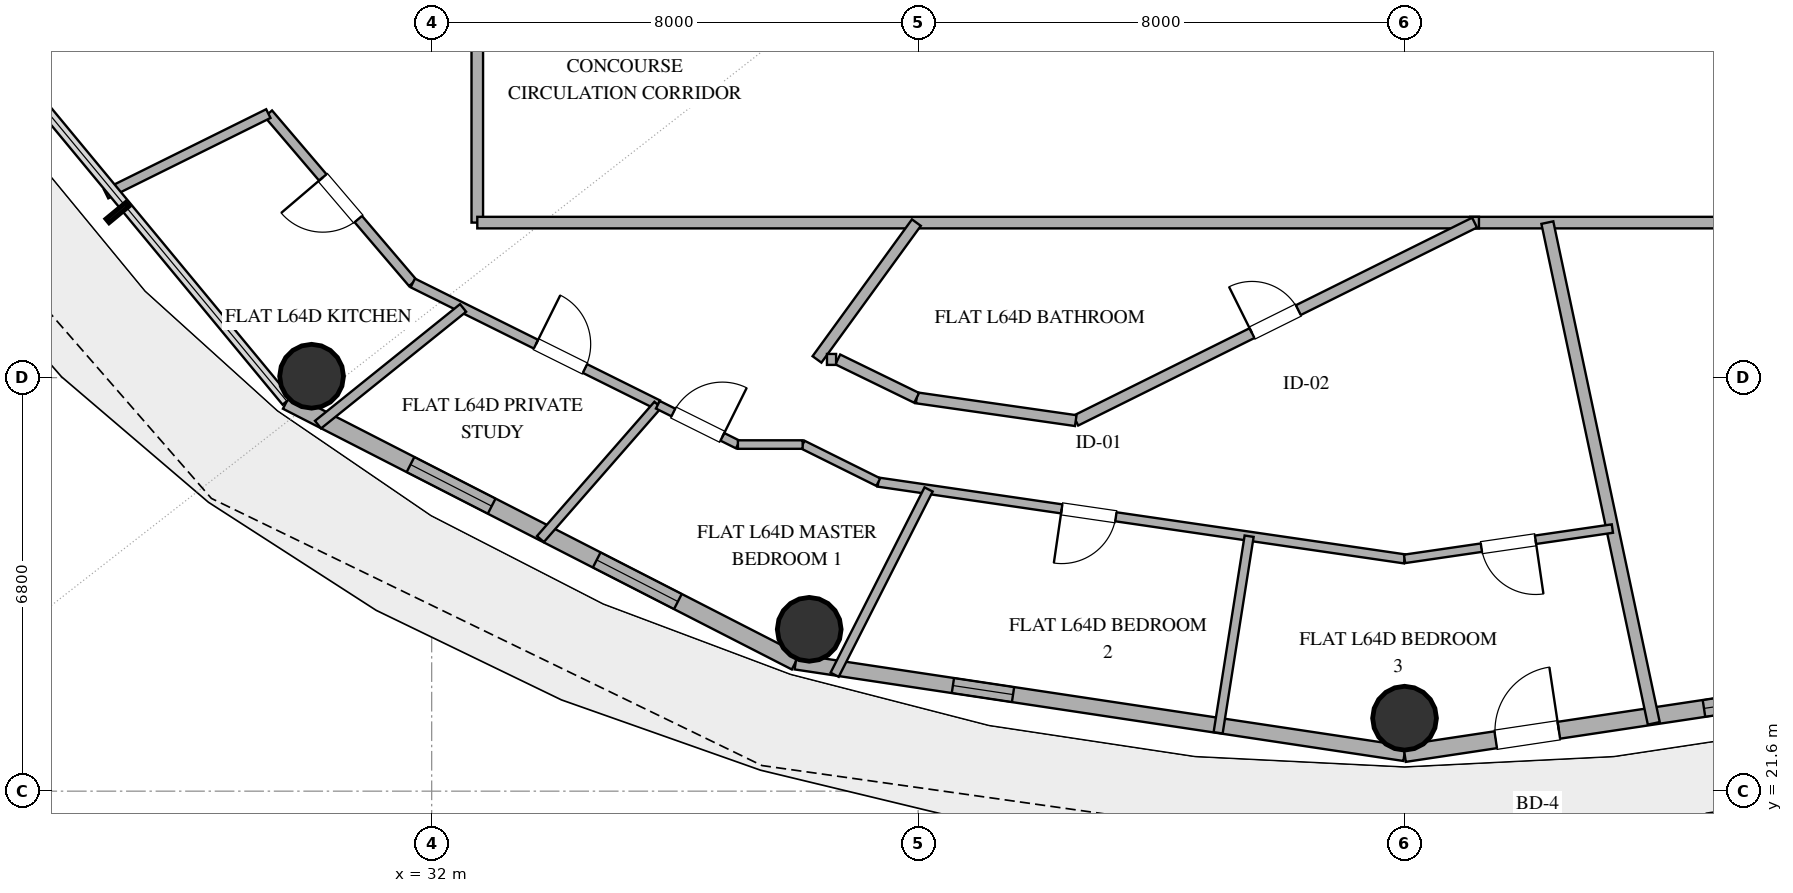
"""IFC4 building model, lengths in metres.
Left out: names, types, materials, properties, quantities, classifications, styles, units other than length and angle.
Written with IfcOpenShell. Run it as: python <this file> out.ifc"""

import sys

from ifc_helpers import new_model, si_unit, direction, frame, frame_2d, origin, origin_2d, place, context, subcontext, project, spatial, rectangle, hollow_circle, extrude, element, fill, save


model = new_model("IFC4")
c1 = context("Model", 3, precision=1e-05, world=origin(), true_north=direction((0.0, 1.0)))
c2 = subcontext(c1, "Body", "Model", "MODEL_VIEW")
j1 = project(units=[si_unit("LENGTHUNIT", "METRE"), si_unit("PLANEANGLEUNIT", "RADIAN")], contexts=[c1])
p1 = place(None, origin())
s1 = spatial("IfcSite", under=j1, at=p1, CompositionType="ELEMENT")
p2 = place(p1, origin())
s2 = spatial("IfcBuilding", under=s1, at=p2, CompositionType="ELEMENT")
p3 = place(p2, frame((0.0, 0.0, 249.6)))
s3 = spatial("IfcBuildingStorey", under=s2, at=p3, CompositionType="ELEMENT", Elevation=249.6)
for number, where, z_axis, x_axis in (
    (1, (30.025, 28.424, 0.0), (0.0, 0.0, 1.0), (1.0, 0.0, 0.0)),
    (2, (38.209, 24.261, 0.0), (0.0, 0.0, 1.0), (1.0, 0.0, 0.0)),
    (3, (48.0, 22.8, 0.0), (0.0, 0.0, 1.0), (1.0, 0.0, 0.0)),
):
    element("IfcColumn", number, at=place(p3, frame(where, z_axis=z_axis, x_axis=x_axis)), inside=s3, PredefinedType="COLUMN", context=c2, shape_type="SweptSolid", body=[
        extrude(hollow_circle(Radius=0.525, WallThickness=0.028, at=origin_2d()), origin(), (0.0, 0.0, 1.0), 3.36),
    ])
p4 = place(p3, frame((29.617, 28.013, 0.0), z_axis=(0.0, 0.0, 1.0), x_axis=(0.890007394051, -0.455946091699, 0.0)))
e4 = element("IfcWall", 4, at=p4, inside=s3, PredefinedType="SOLIDWALL", context=c2, shape_type="SweptSolid", body=[
    extrude(rectangle(XDim=9.404, YDim=0.28, at=frame_2d((4.702, 0.0))), origin(), (0.0, 0.0, 1.0), 3.36),
])
p5 = place(p4, frame((2.286, 0.0, 0.85)))
e5 = element("IfcOpeningElement", 5, at=p5, cuts=e4, PredefinedType="OPENING", context=c2, shape_type="SweptSolid", body=[
    extrude(rectangle(XDim=1.5, YDim=2.0, at=frame_2d((0.75, 1.0))), frame((0.0, 0.15, 0.0), z_axis=(0.0, -1.0, 0.0), x_axis=(1.0, 0.0, 0.0)), (0.0, 0.0, 1.0), 0.3),
])
p6 = place(p4, frame((5.727, 0.0, 0.85)))
e6 = element("IfcOpeningElement", 6, at=p6, cuts=e4, PredefinedType="OPENING", context=c2, shape_type="SweptSolid", body=[
    extrude(rectangle(XDim=1.5, YDim=1.8, at=frame_2d((0.75, 0.9))), frame((0.0, 0.15, 0.0), z_axis=(0.0, -1.0, 0.0), x_axis=(1.0, 0.0, 0.0)), (0.0, 0.0, 1.0), 0.3),
])
p7 = place(p3, frame((37.987, 23.726, 0.0), z_axis=(0.0, 0.0, 1.0), x_axis=(0.988882522213, -0.148698881169, 0.0)))
e7 = element("IfcWall", 7, at=p7, inside=s3, PredefinedType="SOLIDWALL", context=c2, shape_type="SweptSolid", body=[
    extrude(rectangle(XDim=10.125, YDim=0.25, at=frame_2d((5.062, 0.0))), origin(), (0.0, 0.0, 1.0), 3.36),
])
p8 = place(p7, frame((2.614, 0.0, 1.42)))
e8 = element("IfcOpeningElement", 8, at=p8, cuts=e7, PredefinedType="OPENING", context=c2, shape_type="SweptSolid", body=[
    extrude(rectangle(XDim=1.0, YDim=1.05, at=frame_2d((0.5, 0.525))), frame((0.0, 0.135, 0.0), z_axis=(0.0, -1.0, 0.0), x_axis=(1.0, 0.0, 0.0)), (0.0, 0.0, 1.0), 0.27),
])
p9 = place(p3, frame((48.0, 22.22, 0.0), z_axis=(0.0, 0.0, 1.0), x_axis=(0.988882522213, 0.148698881169, 0.0)))
e9 = element("IfcWall", 9, at=p9, inside=s3, PredefinedType="SOLIDWALL", context=c2, shape_type="SweptSolid", body=[
    extrude(rectangle(XDim=10.125, YDim=0.28, at=frame_2d((5.062, 0.0))), origin(), (0.0, 0.0, 1.0), 3.36),
])
p10 = place(p9, frame((1.516, 0.0, 0.0)))
e10 = element("IfcOpeningElement", 10, at=p10, cuts=e9, PredefinedType="OPENING", context=c2, shape_type="SweptSolid", body=[
    extrude(rectangle(XDim=1.05, YDim=2.2, at=frame_2d((0.525, 1.1))), frame((0.0, 0.15, 0.0), z_axis=(0.0, -1.0, 0.0), x_axis=(1.0, 0.0, 0.0)), (0.0, 0.0, 1.0), 0.3),
])
p11 = place(p9, frame((4.98, 0.0, 0.85)))
e11 = element("IfcOpeningElement", 11, at=p11, cuts=e9, PredefinedType="OPENING", context=c2, shape_type="SweptSolid", body=[
    extrude(rectangle(XDim=1.2, YDim=1.8, at=frame_2d((0.6, 0.9))), frame((0.0, 0.15, 0.0), z_axis=(0.0, -1.0, 0.0), x_axis=(1.0, 0.0, 0.0)), (0.0, 0.0, 1.0), 0.3),
])
p12 = place(p9, frame((6.783, 0.0, 0.85)))
e12 = element("IfcOpeningElement", 12, at=p12, cuts=e9, PredefinedType="OPENING", context=c2, shape_type="SweptSolid", body=[
    extrude(rectangle(XDim=1.2, YDim=1.8, at=frame_2d((0.6, 0.9))), frame((0.0, 0.15, 0.0), z_axis=(0.0, -1.0, 0.0), x_axis=(1.0, 0.0, 0.0)), (0.0, 0.0, 1.0), 0.3),
])
p13 = place(p3, frame((63.25, 30.95, 0.0), z_axis=(0.0, 0.0, 1.0), x_axis=(-1.0, 0.0, 0.0)))
e13 = element("IfcWall", 13, at=p13, inside=s3, PredefinedType="PARTITIONING", context=c2, shape_type="SweptSolid", body=[
    extrude(rectangle(XDim=14.17, YDim=0.19, at=frame_2d((7.085, 0.0))), origin(), (0.0, 0.0, 1.0), 2.72),
])
p14 = place(p13, frame((5.967, 0.0, 0.0)))
e14 = element("IfcOpeningElement", 14, at=p14, cuts=e13, PredefinedType="OPENING", context=c2, shape_type="SweptSolid", body=[
    extrude(rectangle(XDim=1.0, YDim=2.2, at=frame_2d((0.5, 1.1))), frame((0.0, 0.105, 0.0), z_axis=(0.0, -1.0, 0.0), x_axis=(1.0, 0.0, 0.0)), (0.0, 0.0, 1.0), 0.21),
])
p15 = place(p3, frame((32.75, 30.95, 0.0), z_axis=(0.0, 0.0, 1.0), x_axis=(0.0, 1.0, 0.0)))
e15 = element("IfcWall", 15, at=p15, inside=s3, PredefinedType="PARTITIONING", context=c2, shape_type="SweptSolid", body=[
    extrude(rectangle(XDim=22.1, YDim=0.19, at=frame_2d((11.05, 0.0))), origin(), (0.0, 0.0, 1.0), 2.72),
])
p16 = place(p15, frame((15.258, 0.0, 0.0)))
e16 = element("IfcOpeningElement", 16, at=p16, cuts=e15, PredefinedType="OPENING", context=c2, shape_type="SweptSolid", body=[
    extrude(rectangle(XDim=1.0, YDim=2.2, at=frame_2d((0.5, 1.1))), frame((0.0, 0.105, 0.0), z_axis=(0.0, -1.0, 0.0), x_axis=(1.0, 0.0, 0.0)), (0.0, 0.0, 1.0), 0.21),
])
p17 = place(p15, frame((4.24, 0.0, 0.0)))
e17 = element("IfcOpeningElement", 17, at=p17, cuts=e15, PredefinedType="OPENING", context=c2, shape_type="SweptSolid", body=[
    extrude(rectangle(XDim=1.0, YDim=2.2, at=frame_2d((0.5, 1.1))), frame((0.0, 0.105, 0.0), z_axis=(0.0, -1.0, 0.0), x_axis=(1.0, 0.0, 0.0)), (0.0, 0.0, 1.0), 0.21),
])
p18 = place(p3, frame((49.224, 30.95, 0.0), z_axis=(0.0, 0.0, 1.0), x_axis=(-1.0, 0.0, 0.0)))
e18 = element("IfcWall", 18, at=p18, inside=s3, PredefinedType="PARTITIONING", context=c2, shape_type="SweptSolid", body=[
    extrude(rectangle(XDim=16.474, YDim=0.19, at=frame_2d((8.237, 0.0))), origin(), (0.0, 0.0, 1.0), 2.72),
])
p19 = place(p3, frame((42.593, 27.694, 0.0), z_axis=(0.0, 0.0, 1.0), x_axis=(0.895690491041, 0.444678023134, 0.0)))
e19 = element("IfcWall", 19, at=p19, inside=s3, PredefinedType="PLUMBINGWALL", context=c2, shape_type="SweptSolid", body=[
    extrude(rectangle(XDim=7.323, YDim=0.18, at=frame_2d((3.662, 0.0))), origin(), (0.0, 0.0, 1.0), 2.72),
])
p20 = place(p19, frame((3.237, 0.0, 0.0)))
e20 = element("IfcOpeningElement", 20, at=p20, cuts=e19, PredefinedType="OPENING", context=c2, shape_type="SweptSolid", body=[
    extrude(rectangle(XDim=0.85, YDim=2.1, at=frame_2d((0.425, 1.05))), frame((0.0, 0.1, 0.0), z_axis=(0.0, -1.0, 0.0), x_axis=(1.0, 0.0, 0.0)), (0.0, 0.0, 1.0), 0.2),
])
p21 = place(p3, frame((48.0, 25.42, 0.0), z_axis=(0.0, 0.0, 1.0), x_axis=(-0.989532150642, 0.144312587273, 0.0)))
e21 = element("IfcWall", 21, at=p21, inside=s3, PredefinedType="PARTITIONING", context=c2, shape_type="SweptSolid", body=[
    extrude(rectangle(XDim=8.746, YDim=0.15, at=frame_2d((4.373, 0.0))), origin(), (0.0, 0.0, 1.0), 2.72),
])
p22 = place(p21, frame((4.798, 0.0, 0.0)))
e22 = element("IfcOpeningElement", 22, at=p22, cuts=e21, PredefinedType="OPENING", context=c2, shape_type="SweptSolid", body=[
    extrude(rectangle(XDim=0.9, YDim=2.1, at=frame_2d((0.45, 1.05))), frame((0.0, 0.085, 0.0), z_axis=(0.0, -1.0, 0.0), x_axis=(1.0, 0.0, 0.0)), (0.0, 0.0, 1.0), 0.17),
])
p23 = place(p3, frame((50.349, 30.95, 0.0), z_axis=(0.0, 0.0, 1.0), x_axis=(0.207930550935, -0.978143591702, 0.0)))
e23 = element("IfcWall", 23, at=p23, inside=s3, PredefinedType="PARTITIONING", context=c2, shape_type="SweptSolid", body=[
    extrude(rectangle(XDim=8.419, YDim=0.2, at=frame_2d((4.209, 0.0))), origin(), (0.0, 0.0, 1.0), 2.72),
])
p24 = place(p3, frame((31.689, 29.958, 0.0), z_axis=(0.0, 0.0, 1.0), x_axis=(-0.648993169548, 0.7607942336, 0.0)))
e24 = element("IfcWall", 24, at=p24, inside=s3, PredefinedType="PLUMBINGWALL", context=c2, shape_type="SweptSolid", body=[
    extrude(rectangle(XDim=3.66, YDim=0.16, at=frame_2d((1.83, 0.0))), origin(), (0.0, 0.0, 1.0), 2.72),
])
p25 = place(p24, frame((1.38, 0.0, 0.0)))
e25 = element("IfcOpeningElement", 25, at=p25, cuts=e24, PredefinedType="OPENING", context=c2, shape_type="SweptSolid", body=[
    extrude(rectangle(XDim=0.9, YDim=2.1, at=frame_2d((0.45, 1.05))), frame((0.0, 0.09, 0.0), z_axis=(0.0, -1.0, 0.0), x_axis=(1.0, 0.0, 0.0)), (0.0, 0.0, 1.0), 0.18),
])
p26 = place(p3, frame((31.689, 29.958, 0.0), z_axis=(0.0, 0.0, 1.0), x_axis=(0.895477004863, -0.445107777691, 0.0)))
e26 = element("IfcWall", 26, at=p26, inside=s3, PredefinedType="PLUMBINGWALL", context=c2, shape_type="SweptSolid", body=[
    extrude(rectangle(XDim=4.501, YDim=0.16, at=frame_2d((2.25, 0.0))), origin(), (0.0, 0.0, 1.0), 2.72),
])
p27 = place(p26, frame((2.263, 0.0, 0.0)))
e27 = element("IfcOpeningElement", 27, at=p27, cuts=e26, PredefinedType="OPENING", context=c2, shape_type="SweptSolid", body=[
    extrude(rectangle(XDim=0.9, YDim=2.1, at=frame_2d((0.45, 1.05))), frame((0.0, 0.09, 0.0), z_axis=(0.0, -1.0, 0.0), x_axis=(1.0, 0.0, 0.0)), (0.0, 0.0, 1.0), 0.18),
])
p28 = place(p3, frame((51.418, 25.918, 0.0), z_axis=(0.0, 0.0, 1.0), x_axis=(-0.989531088682, -0.144319868801, 0.0)))
e28 = element("IfcWall", 28, at=p28, inside=s3, PredefinedType="PARTITIONING", context=c2, shape_type="SweptSolid", body=[
    extrude(rectangle(XDim=3.454, YDim=0.14, at=frame_2d((1.727, 0.0))), origin(), (0.0, 0.0, 1.0), 2.72),
])
p29 = place(p28, frame((1.277, 0.0, 0.0)))
e29 = element("IfcOpeningElement", 29, at=p29, cuts=e28, PredefinedType="OPENING", context=c2, shape_type="SweptSolid", body=[
    extrude(rectangle(XDim=0.9, YDim=2.1, at=frame_2d((0.45, 1.05))), frame((0.0, 0.08, 0.0), z_axis=(0.0, -1.0, 0.0), x_axis=(1.0, 0.0, 0.0)), (0.0, 0.0, 1.0), 0.16),
])
p30 = place(p3, frame((40.172, 26.562, 0.0), z_axis=(0.0, 0.0, 1.0), x_axis=(-0.452265757691, -0.891883223533, 0.0)))
e30 = element("IfcWall", 30, at=p30, inside=s3, PredefinedType="PARTITIONING", context=c2, shape_type="SweptSolid", body=[
    extrude(rectangle(XDim=3.417, YDim=0.15, at=frame_2d((1.708, 0.0))), origin(), (0.0, 0.0, 1.0), 2.72),
])
p31 = place(p3, frame((44.934, 22.56, 0.0), z_axis=(0.0, 0.0, 1.0), x_axis=(0.155828503033, 0.98778412502, 0.0)))
e31 = element("IfcWall", 31, at=p31, inside=s3, PredefinedType="PARTITIONING", context=c2, shape_type="SweptSolid", body=[
    extrude(rectangle(XDim=3.273, YDim=0.15, at=frame_2d((1.636, 0.0))), origin(), (0.0, 0.0, 1.0), 2.72),
])
p32 = place(p3, frame((30.131, 27.627, 0.0), z_axis=(0.0, 0.0, 1.0), x_axis=(0.779248157205, 0.62671549326, 0.0)))
e32 = element("IfcWall", 32, at=p32, inside=s3, PredefinedType="PLUMBINGWALL", context=c2, shape_type="SweptSolid", body=[
    extrude(rectangle(XDim=3.062, YDim=0.16, at=frame_2d((1.531, 0.0))), origin(), (0.0, 0.0, 1.0), 2.72),
])
p33 = place(p3, frame((29.314, 32.742, 0.0), z_axis=(0.0, 0.0, 1.0), x_axis=(-0.896093729672, -0.443864875432, 0.0)))
e33 = element("IfcWall", 33, at=p33, inside=s3, PredefinedType="PLUMBINGWALL", context=c2, shape_type="SweptSolid", body=[
    extrude(rectangle(XDim=2.977, YDim=0.16, at=frame_2d((1.489, 0.0))), origin(), (0.0, 0.0, 1.0), 2.72),
])
p34 = place(p3, frame((35.719, 27.955, 0.0), z_axis=(0.0, 0.0, 1.0), x_axis=(-0.658257126569, -0.752793169019, 0.0)))
e34 = element("IfcWall", 34, at=p34, inside=s3, PredefinedType="PARTITIONING", context=c2, shape_type="SweptSolid", body=[
    extrude(rectangle(XDim=2.934, YDim=0.15, at=frame_2d((1.467, 0.0))), origin(), (0.0, 0.0, 1.0), 2.72),
])
p35 = place(p3, frame((39.972, 30.95, 0.0), z_axis=(0.0, 0.0, 1.0), x_axis=(-0.587795827483, -0.809009310944, 0.0)))
e35 = element("IfcWall", 35, at=p35, inside=s3, PredefinedType="PLUMBINGWALL", context=c2, shape_type="SweptSolid", body=[
    extrude(rectangle(XDim=2.781, YDim=0.18, at=frame_2d((1.391, 0.0))), origin(), (0.0, 0.0, 1.0), 2.72),
])
p36 = place(p3, frame((39.976, 28.068, 0.0), z_axis=(0.0, 0.0, 1.0), x_axis=(0.989923613655, -0.141602398034, 0.0)))
e36 = element("IfcWall", 36, at=p36, inside=s3, PredefinedType="PLUMBINGWALL", context=c2, shape_type="SweptSolid", body=[
    extrude(rectangle(XDim=2.643, YDim=0.18, at=frame_2d((1.322, 0.0))), origin(), (0.0, 0.0, 1.0), 2.72),
])
p37 = place(p3, frame((35.719, 27.955, 0.0), z_axis=(0.0, 0.0, 1.0), x_axis=(0.895454269924, -0.445153513381, 0.0)))
e37 = element("IfcWall", 37, at=p37, inside=s3, PredefinedType="PARTITIONING", context=c2, shape_type="SweptSolid", body=[
    extrude(rectangle(XDim=1.47, YDim=0.14, at=frame_2d((0.735, 0.0))), origin(), (0.0, 0.0, 1.0), 2.72),
])
p38 = place(p37, frame((0.285, 0.0, 0.0)))
e38 = element("IfcOpeningElement", 38, at=p38, cuts=e37, PredefinedType="OPENING", context=c2, shape_type="SweptSolid", body=[
    extrude(rectangle(XDim=0.9, YDim=2.1, at=frame_2d((0.45, 1.05))), frame((0.0, 0.08, 0.0), z_axis=(0.0, -1.0, 0.0), x_axis=(1.0, 0.0, 0.0)), (0.0, 0.0, 1.0), 0.16),
])
p39 = place(p3, frame((38.679, 28.7, 0.0), z_axis=(0.0, 0.0, 1.0), x_axis=(0.898916394035, -0.438120207861, 0.0)))
e39 = element("IfcWall", 39, at=p39, inside=s3, PredefinedType="PLUMBINGWALL", context=c2, shape_type="SweptSolid", body=[
    extrude(rectangle(XDim=1.443, YDim=0.18, at=frame_2d((0.721, 0.0))), origin(), (0.0, 0.0, 1.0), 2.72),
])
p40 = place(p3, frame((38.101, 27.3, 0.0), z_axis=(0.0, 0.0, 1.0), x_axis=(0.895584310315, -0.444891833053, 0.0)))
e40 = element("IfcWall", 40, at=p40, inside=s3, PredefinedType="PARTITIONING", context=c2, shape_type="SweptSolid", body=[
    extrude(rectangle(XDim=1.389, YDim=0.14, at=frame_2d((0.694, 0.0))), origin(), (0.0, 0.0, 1.0), 2.72),
])
p41 = place(p3, frame((37.036, 27.3, 0.0), z_axis=(0.0, 0.0, 1.0), x_axis=(1.0, 0.0, 0.0)))
e41 = element("IfcWall", 41, at=p41, inside=s3, PredefinedType="PARTITIONING", context=c2, shape_type="SweptSolid", body=[
    extrude(rectangle(XDim=1.065, YDim=0.14, at=frame_2d((0.533, 0.0))), origin(), (0.0, 0.0, 1.0), 2.72),
])
p42 = place(p3, frame((38.501, 28.7, 0.0), z_axis=(0.0, 0.0, 1.0), x_axis=(1.0, 0.0, 0.0)))
e42 = element("IfcWall", 42, at=p42, inside=s3, PredefinedType="PLUMBINGWALL", context=c2, shape_type="SweptSolid", body=[
    extrude(rectangle(XDim=0.15, YDim=0.18, at=frame_2d((0.075, 0.0))), origin(), (0.0, 0.0, 1.0), 2.72),
])
p43 = place(p5, origin())
e43 = element("IfcWindow", 43, at=p43, inside=s3, PartitioningType="SINGLE_PANEL", PredefinedType="WINDOW", context=c2, shape_type="SweptSolid", body=[
    extrude(rectangle(XDim=1.5, YDim=2.0, at=frame_2d((0.75, 1.0))), frame((0.0, 0.03, 0.0), z_axis=(0.0, -1.0, 0.0), x_axis=(1.0, 0.0, 0.0)), (0.0, 0.0, 1.0), 0.06),
])
fill(e5, e43)
p44 = place(p6, origin())
e44 = element("IfcWindow", 44, at=p44, inside=s3, PartitioningType="SINGLE_PANEL", PredefinedType="WINDOW", context=c2, shape_type="SweptSolid", body=[
    extrude(rectangle(XDim=1.5, YDim=1.8, at=frame_2d((0.75, 0.9))), frame((0.0, 0.03, 0.0), z_axis=(0.0, -1.0, 0.0), x_axis=(1.0, 0.0, 0.0)), (0.0, 0.0, 1.0), 0.06),
])
fill(e6, e44)
p45 = place(p10, origin())
e45 = element("IfcDoor", 45, at=p45, inside=s3, OperationType="SINGLE_SWING_RIGHT", PredefinedType="DOOR", context=c2, shape_type="SweptSolid", body=[
    extrude(rectangle(XDim=1.05, YDim=2.2, at=frame_2d((0.525, 1.1))), frame((0.0, 0.025, 0.0), z_axis=(0.0, -1.0, 0.0), x_axis=(1.0, 0.0, 0.0)), (0.0, 0.0, 1.0), 0.05),
])
fill(e10, e45)
p46 = place(p11, origin())
e46 = element("IfcWindow", 46, at=p46, inside=s3, PartitioningType="SINGLE_PANEL", PredefinedType="WINDOW", context=c2, shape_type="SweptSolid", body=[
    extrude(rectangle(XDim=1.2, YDim=1.8, at=frame_2d((0.6, 0.9))), frame((0.0, 0.03, 0.0), z_axis=(0.0, -1.0, 0.0), x_axis=(1.0, 0.0, 0.0)), (0.0, 0.0, 1.0), 0.06),
])
fill(e11, e46)
p47 = place(p8, origin())
e47 = element("IfcWindow", 47, at=p47, inside=s3, PartitioningType="SINGLE_PANEL", PredefinedType="WINDOW", context=c2, shape_type="SweptSolid", body=[
    extrude(rectangle(XDim=1.0, YDim=1.05, at=frame_2d((0.5, 0.525))), frame((0.0, 0.03, 0.0), z_axis=(0.0, -1.0, 0.0), x_axis=(1.0, 0.0, 0.0)), (0.0, 0.0, 1.0), 0.06),
])
fill(e8, e47)
p48 = place(p20, origin())
e48 = element("IfcDoor", 48, at=p48, inside=s3, OperationType="SINGLE_SWING_LEFT", PredefinedType="DOOR", context=c2, shape_type="SweptSolid", body=[
    extrude(rectangle(XDim=0.85, YDim=2.1, at=frame_2d((0.425, 1.05))), frame((0.0, 0.025, 0.0), z_axis=(0.0, -1.0, 0.0), x_axis=(1.0, 0.0, 0.0)), (0.0, 0.0, 1.0), 0.05),
])
fill(e20, e48)
p49 = place(p22, origin())
e49 = element("IfcDoor", 49, at=p49, inside=s3, OperationType="SINGLE_SWING_RIGHT", PredefinedType="DOOR", context=c2, shape_type="SweptSolid", body=[
    extrude(rectangle(XDim=0.9, YDim=2.1, at=frame_2d((0.45, 1.05))), frame((0.0, 0.025, 0.0), z_axis=(0.0, -1.0, 0.0), x_axis=(1.0, 0.0, 0.0)), (0.0, 0.0, 1.0), 0.05),
])
fill(e22, e49)
p50 = place(p25, origin())
e50 = element("IfcDoor", 50, at=p50, inside=s3, OperationType="SINGLE_SWING_RIGHT", PredefinedType="DOOR", context=c2, shape_type="SweptSolid", body=[
    extrude(rectangle(XDim=0.9, YDim=2.1, at=frame_2d((0.45, 1.05))), frame((0.0, 0.025, 0.0), z_axis=(0.0, -1.0, 0.0), x_axis=(1.0, 0.0, 0.0)), (0.0, 0.0, 1.0), 0.05),
])
fill(e25, e50)
p51 = place(p27, origin())
e51 = element("IfcDoor", 51, at=p51, inside=s3, OperationType="SINGLE_SWING_LEFT", PredefinedType="DOOR", context=c2, shape_type="SweptSolid", body=[
    extrude(rectangle(XDim=0.9, YDim=2.1, at=frame_2d((0.45, 1.05))), frame((0.0, 0.025, 0.0), z_axis=(0.0, -1.0, 0.0), x_axis=(1.0, 0.0, 0.0)), (0.0, 0.0, 1.0), 0.05),
])
fill(e27, e51)
p52 = place(p29, origin())
e52 = element("IfcDoor", 52, at=p52, inside=s3, OperationType="SINGLE_SWING_LEFT", PredefinedType="DOOR", context=c2, shape_type="SweptSolid", body=[
    extrude(rectangle(XDim=0.9, YDim=2.1, at=frame_2d((0.45, 1.05))), frame((0.0, 0.025, 0.0), z_axis=(0.0, -1.0, 0.0), x_axis=(1.0, 0.0, 0.0)), (0.0, 0.0, 1.0), 0.05),
])
fill(e29, e52)
p53 = place(p38, origin())
e53 = element("IfcDoor", 53, at=p53, inside=s3, OperationType="SINGLE_SWING_RIGHT", PredefinedType="DOOR", context=c2, shape_type="SweptSolid", body=[
    extrude(rectangle(XDim=0.9, YDim=2.1, at=frame_2d((0.45, 1.05))), frame((0.0, 0.025, 0.0), z_axis=(0.0, -1.0, 0.0), x_axis=(1.0, 0.0, 0.0)), (0.0, 0.0, 1.0), 0.05),
])
fill(e38, e53)
save(model, sys.argv[1])
